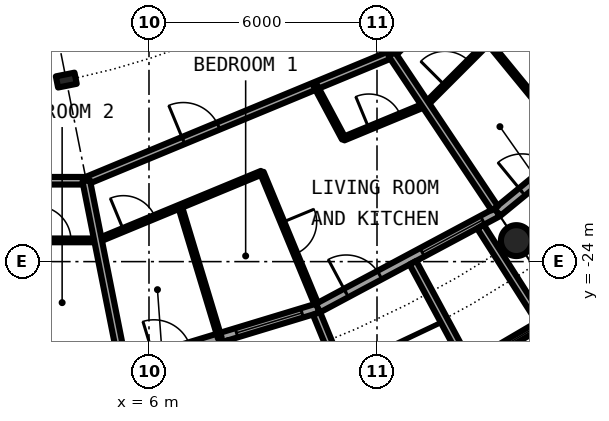
"""IFC4 building model, lengths in metres.
Left out: names, types, materials, properties, quantities, classifications, styles, units other than length and angle.
Written with IfcOpenShell. Run it as: python <this file> out.ifc"""

import sys

from ifc_helpers import new_model, si_unit, direction, frame, frame_2d, origin, origin_2d, place, context, subcontext, project, spatial, rectangle, circle, hollow_circle, i_section, extrude, element, fill, save


model = new_model("IFC4")
c1 = context("Model", 3, precision=1e-05, world=origin(), true_north=direction((0.0, 1.0)))
c2 = subcontext(c1, "Body", "Model", "MODEL_VIEW")
j1 = project(units=[si_unit("LENGTHUNIT", "METRE"), si_unit("PLANEANGLEUNIT", "RADIAN")], contexts=[c1])
p1 = place(None, origin())
s1 = spatial("IfcSite", under=j1, at=p1, CompositionType="ELEMENT")
p2 = place(p1, origin())
s2 = spatial("IfcBuilding", under=s1, at=p2, CompositionType="ELEMENT")
p3 = place(p2, frame((0.0, 0.0, 170.75)))
s3 = spatial("IfcBuildingStorey", under=s2, at=p3, CompositionType="ELEMENT", Elevation=170.75)
p4 = place(p3, frame((15.667, -23.448, 0.0), z_axis=(0.0, 0.0, 1.0), x_axis=(1.0, 0.0, 0.0)))
e1 = element("IfcColumn", 1, at=p4, inside=s3, PredefinedType="COLUMN", context=c2, shape_type="SweptSolid", body=[
    extrude(hollow_circle(Radius=0.406, WallThickness=0.04, at=origin_2d()), origin(), (0.0, 0.0, 1.0), 3.05),
])
p5 = place(p3, frame((3.824, -19.223, 0.0), z_axis=(0.0, 0.0, 1.0), x_axis=(0.195090322016, -0.980785280403, 0.0)))
e2 = element("IfcColumn", 2, at=p5, inside=s3, PredefinedType="COLUMN", context=c2, shape_type="SweptSolid", body=[
    extrude(i_section(OverallWidth=0.3, OverallDepth=0.5, WebThickness=0.014, FlangeThickness=0.028, FilletRadius=0.027, at=origin_2d()), origin(), (0.0, 0.0, 1.0), 3.05),
])
p6 = place(p3, frame((5.326, -26.775, 0.0), z_axis=(0.0, 0.0, 1.0), x_axis=(0.956965678721, 0.290201119486, 0.0)))
e3 = element("IfcWall", 3, at=p6, inside=s3, PredefinedType="SOLIDWALL", context=c2, shape_type="SweptSolid", body=[
    extrude(rectangle(XDim=5.351, YDim=0.25, at=frame_2d((2.676, 0.0))), origin(), (0.0, 0.0, 1.0), 2.7),
])
p7 = place(p6, frame((0.841, 0.0, 0.0)))
e4 = element("IfcOpeningElement", 4, at=p7, cuts=e3, PredefinedType="OPENING", context=c2, shape_type="SweptSolid", body=[
    extrude(rectangle(XDim=1.0, YDim=2.2, at=frame_2d((0.5, 1.1))), frame((0.0, 0.135, 0.0), z_axis=(0.0, -1.0, 0.0), x_axis=(1.0, 0.0, 0.0)), (0.0, 0.0, 1.0), 0.27),
])
p8 = place(p6, frame((3.111, 0.0, 0.3)))
e5 = element("IfcOpeningElement", 5, at=p8, cuts=e3, PredefinedType="OPENING", context=c2, shape_type="SweptSolid", body=[
    extrude(rectangle(XDim=1.8, YDim=2.1, at=frame_2d((0.9, 1.05))), frame((0.0, 0.135, 0.0), z_axis=(0.0, -1.0, 0.0), x_axis=(1.0, 0.0, 0.0)), (0.0, 0.0, 1.0), 0.27),
])
p9 = place(p3, frame((8.009, -26.092, -0.03), z_axis=(0.0, 0.0, 1.0), x_axis=(0.293406695073, -0.955987715029, 0.0)))
e6 = element("IfcWall", 6, at=p9, inside=s3, PredefinedType="SOLIDWALL", context=c2, shape_type="SweptSolid", body=[
    extrude(rectangle(XDim=3.006, YDim=0.2, at=frame_2d((1.503, 0.0))), origin(), (0.0, 0.0, 1.0), 2.73),
])
p10 = place(p3, frame((10.409, -25.364, -0.03), z_axis=(0.0, 0.0, 1.0), x_axis=(0.379509886562, -0.925187681501, 0.0)))
e7 = element("IfcWall", 7, at=p10, inside=s3, PredefinedType="SOLIDWALL", context=c2, shape_type="SweptSolid", body=[
    extrude(rectangle(XDim=2.883, YDim=0.2, at=frame_2d((1.441, 0.0))), origin(), (0.0, 0.0, 1.0), 2.73),
])
p11 = place(p3, frame((10.447, -25.222, 0.0), z_axis=(0.0, 0.0, 1.0), x_axis=(0.881915646801, 0.471407246368, 0.0)))
e8 = element("IfcWall", 8, at=p11, inside=s3, PredefinedType="SOLIDWALL", context=c2, shape_type="SweptSolid", body=[
    extrude(rectangle(XDim=5.352, YDim=0.25, at=frame_2d((2.676, 0.0))), origin(), (0.0, 0.0, 1.0), 2.7),
])
p12 = place(p11, frame((0.841, 0.0, 0.0)))
e9 = element("IfcOpeningElement", 9, at=p12, cuts=e8, PredefinedType="OPENING", context=c2, shape_type="SweptSolid", body=[
    extrude(rectangle(XDim=1.0, YDim=2.2, at=frame_2d((0.5, 1.1))), frame((0.0, 0.135, 0.0), z_axis=(0.0, -1.0, 0.0), x_axis=(1.0, 0.0, 0.0)), (0.0, 0.0, 1.0), 0.27),
])
p13 = place(p11, frame((3.111, 0.0, 0.3)))
e10 = element("IfcOpeningElement", 10, at=p13, cuts=e8, PredefinedType="OPENING", context=c2, shape_type="SweptSolid", body=[
    extrude(rectangle(XDim=1.8, YDim=2.1, at=frame_2d((0.9, 1.05))), frame((0.0, 0.135, 0.0), z_axis=(0.0, -1.0, 0.0), x_axis=(1.0, 0.0, 0.0)), (0.0, 0.0, 1.0), 0.27),
])
p14 = place(p3, frame((14.327, -26.812, -0.03), z_axis=(0.0, 0.0, 1.0), x_axis=(0.862403467503, 0.506221551535, 0.0)))
e11 = element("IfcWall", 11, at=p14, inside=s3, PredefinedType="SOLIDWALL", context=c2, shape_type="SweptSolid", body=[
    extrude(rectangle(XDim=2.446, YDim=0.2, at=frame_2d((1.223, 0.0))), origin(), (0.0, 0.0, 1.0), 2.73),
])
p15 = place(p14, frame((0.183, 0.0, 0.33)))
e12 = element("IfcOpeningElement", 12, at=p15, cuts=e11, PredefinedType="OPENING", context=c2, shape_type="SweptSolid", body=[
    extrude(circle(Radius=1.04, at=frame_2d((1.04, 1.04))), frame((0.0, 0.11, 0.0), z_axis=(0.0, -1.0, 0.0), x_axis=(1.0, 0.0, 0.0)), (0.0, 0.0, 1.0), 0.22),
])
p16 = place(p3, frame((12.945, -24.029, -0.03), z_axis=(0.0, 0.0, 1.0), x_axis=(0.474424310775, -0.88029629861, 0.0)))
e13 = element("IfcWall", 13, at=p16, inside=s3, PredefinedType="SOLIDWALL", context=c2, shape_type="SweptSolid", body=[
    extrude(rectangle(XDim=3.006, YDim=0.2, at=frame_2d((1.503, 0.0))), origin(), (0.0, 0.0, 1.0), 2.73),
])
p17 = place(p3, frame((14.722, -23.079, -0.03), z_axis=(0.0, 0.0, 1.0), x_axis=(0.537572179146, -0.843217737129, 0.0)))
e14 = element("IfcWall", 14, at=p17, inside=s3, PredefinedType="SOLIDWALL", context=c2, shape_type="SweptSolid", body=[
    extrude(rectangle(XDim=2.924, YDim=0.2, at=frame_2d((1.462, 0.0))), origin(), (0.0, 0.0, 1.0), 2.73),
])
p18 = place(p3, frame((15.167, -22.699, 0.0), z_axis=(0.0, 0.0, 1.0), x_axis=(0.773019449054, 0.634382322723, 0.0)))
e15 = element("IfcWall", 15, at=p18, inside=s3, PredefinedType="SOLIDWALL", context=c2, shape_type="SweptSolid", body=[
    extrude(rectangle(XDim=5.352, YDim=0.25, at=frame_2d((2.676, 0.0))), origin(), (0.0, 0.0, 1.0), 2.7),
])
p19 = place(p18, frame((0.841, 0.0, 0.0)))
e16 = element("IfcOpeningElement", 16, at=p19, cuts=e15, PredefinedType="OPENING", context=c2, shape_type="SweptSolid", body=[
    extrude(rectangle(XDim=1.0, YDim=2.2, at=frame_2d((0.5, 1.1))), frame((0.0, 0.135, 0.0), z_axis=(0.0, -1.0, 0.0), x_axis=(1.0, 0.0, 0.0)), (0.0, 0.0, 1.0), 0.27),
])
p20 = place(p18, frame((3.111, 0.0, 0.3)))
e17 = element("IfcOpeningElement", 17, at=p20, cuts=e15, PredefinedType="OPENING", context=c2, shape_type="SweptSolid", body=[
    extrude(rectangle(XDim=1.8, YDim=2.1, at=frame_2d((0.9, 1.05))), frame((0.0, 0.135, 0.0), z_axis=(0.0, -1.0, 0.0), x_axis=(1.0, 0.0, 0.0)), (0.0, 0.0, 1.0), 0.27),
])
p21 = place(p3, frame((0.0, -23.441, 0.0), z_axis=(0.0, 0.0, 1.0), x_axis=(1.0, 0.0, 0.0)))
e18 = element("IfcWall", 18, at=p21, inside=s3, PredefinedType="PARTITIONING", context=c2, shape_type="SweptSolid", body=[
    extrude(rectangle(XDim=4.663, YDim=0.1, at=frame_2d((2.332, 0.0))), origin(), (0.0, 0.0, 1.0), 2.7),
])
p22 = place(p21, frame((3.047, 0.0, 0.0)))
e19 = element("IfcOpeningElement", 19, at=p22, cuts=e18, PredefinedType="OPENING", context=c2, shape_type="SweptSolid", body=[
    extrude(rectangle(XDim=0.9, YDim=2.3, at=frame_2d((0.45, 1.15))), frame((0.0, 0.06, 0.0), z_axis=(0.0, -1.0, 0.0), x_axis=(1.0, 0.0, 0.0)), (0.0, 0.0, 1.0), 0.12),
])
p23 = place(p3, frame((4.656, -23.442, 0.0), z_axis=(0.0, 0.0, 1.0), x_axis=(0.923994503548, 0.382405749712, 0.0)))
e20 = element("IfcWall", 20, at=p23, inside=s3, PredefinedType="PARTITIONING", context=c2, shape_type="SweptSolid", body=[
    extrude(rectangle(XDim=4.663, YDim=0.1, at=frame_2d((2.331, 0.0))), origin(), (0.0, 0.0, 1.0), 2.7),
])
p24 = place(p23, frame((0.726, 0.0, 0.0)))
e21 = element("IfcOpeningElement", 21, at=p24, cuts=e20, PredefinedType="OPENING", context=c2, shape_type="SweptSolid", body=[
    extrude(rectangle(XDim=0.9, YDim=2.3, at=frame_2d((0.45, 1.15))), frame((0.0, 0.06, 0.0), z_axis=(0.0, -1.0, 0.0), x_axis=(1.0, 0.0, 0.0)), (0.0, 0.0, 1.0), 0.12),
])
p25 = place(p3, frame((11.124, -20.764, 0.0), z_axis=(0.0, 0.0, 1.0), x_axis=(0.923938991376, 0.382539854414, 0.0)))
e22 = element("IfcWall", 22, at=p25, inside=s3, PredefinedType="PARTITIONING", context=c2, shape_type="SweptSolid", body=[
    extrude(rectangle(XDim=2.331, YDim=0.1, at=frame_2d((1.166, 0.0))), origin(), (0.0, 0.0, 1.0), 2.7),
])
p26 = place(p25, frame((0.716, 0.0, 0.0)))
e23 = element("IfcOpeningElement", 23, at=p26, cuts=e22, PredefinedType="OPENING", context=c2, shape_type="SweptSolid", body=[
    extrude(rectangle(XDim=0.9, YDim=2.3, at=frame_2d((0.45, 1.15))), frame((0.0, 0.06, 0.0), z_axis=(0.0, -1.0, 0.0), x_axis=(1.0, 0.0, 0.0)), (0.0, 0.0, 1.0), 0.12),
])
p27 = place(p3, frame((13.285, -19.869, 0.0), z_axis=(0.0, 0.0, 1.0), x_axis=(0.706923494552, 0.707290020325, 0.0)))
e24 = element("IfcWall", 24, at=p27, inside=s3, PredefinedType="PARTITIONING", context=c2, shape_type="SweptSolid", body=[
    extrude(rectangle(XDim=4.663, YDim=0.1, at=frame_2d((2.331, 0.0))), origin(), (0.0, 0.0, 1.0), 2.7),
])
p28 = place(p27, frame((0.712, 0.0, 0.0)))
e25 = element("IfcOpeningElement", 25, at=p28, cuts=e24, PredefinedType="OPENING", context=c2, shape_type="SweptSolid", body=[
    extrude(rectangle(XDim=0.9, YDim=2.3, at=frame_2d((0.45, 1.15))), frame((0.0, 0.06, 0.0), z_axis=(0.0, -1.0, 0.0), x_axis=(1.0, 0.0, 0.0)), (0.0, 0.0, 1.0), 0.12),
])
p29 = place(p3, frame((-4.351, -21.872, 0.0), z_axis=(0.0, 0.0, 1.0), x_axis=(1.0, 0.0, 0.0)))
e26 = element("IfcWall", 26, at=p29, inside=s3, PredefinedType="PARTITIONING", context=c2, shape_type="SweptSolid", body=[
    extrude(rectangle(XDim=8.702, YDim=0.2, at=frame_2d((4.351, 0.0))), origin(), (0.0, 0.0, 1.0), 2.7),
])
p30 = place(p29, frame((4.939, 0.0, 0.0)))
e27 = element("IfcOpeningElement", 27, at=p30, cuts=e26, PredefinedType="OPENING", context=c2, shape_type="SweptSolid", body=[
    extrude(rectangle(XDim=1.0, YDim=2.3, at=frame_2d((0.5, 1.15))), frame((0.0, 0.11, 0.0), z_axis=(0.0, -1.0, 0.0), x_axis=(1.0, 0.0, 0.0)), (0.0, 0.0, 1.0), 0.22),
])
p31 = place(p3, frame((4.351, -21.872, 0.0), z_axis=(0.0, 0.0, 1.0), x_axis=(0.923825356298, 0.382814199136, 0.0)))
e28 = element("IfcWall", 28, at=p31, inside=s3, PredefinedType="PARTITIONING", context=c2, shape_type="SweptSolid", body=[
    extrude(rectangle(XDim=8.704, YDim=0.2, at=frame_2d((4.352, 0.0))), origin(), (0.0, 0.0, 1.0), 2.7),
])
p32 = place(p31, frame((2.763, 0.0, 0.0)))
e29 = element("IfcOpeningElement", 29, at=p32, cuts=e28, PredefinedType="OPENING", context=c2, shape_type="SweptSolid", body=[
    extrude(rectangle(XDim=1.0, YDim=2.3, at=frame_2d((0.5, 1.15))), frame((0.0, 0.11, 0.0), z_axis=(0.0, -1.0, 0.0), x_axis=(1.0, 0.0, 0.0)), (0.0, 0.0, 1.0), 0.22),
])
p33 = place(p3, frame((12.389, -18.542, 0.0), z_axis=(0.0, 0.0, 1.0), x_axis=(0.707106781187, 0.707106781187, 0.0)))
e30 = element("IfcWall", 30, at=p33, inside=s3, PredefinedType="PARTITIONING", context=c2, shape_type="SweptSolid", body=[
    extrude(rectangle(XDim=8.702, YDim=0.2, at=frame_2d((4.351, 0.0))), origin(), (0.0, 0.0, 1.0), 2.7),
])
p34 = place(p33, frame((2.763, 0.0, 0.0)))
e31 = element("IfcOpeningElement", 31, at=p34, cuts=e30, PredefinedType="OPENING", context=c2, shape_type="SweptSolid", body=[
    extrude(rectangle(XDim=1.0, YDim=2.3, at=frame_2d((0.5, 1.15))), frame((0.0, 0.11, 0.0), z_axis=(0.0, -1.0, 0.0), x_axis=(1.0, 0.0, 0.0)), (0.0, 0.0, 1.0), 0.22),
])
p35 = place(p3, frame((4.348, -21.873, 0.0), z_axis=(0.0, 0.0, 1.0), x_axis=(0.194931286287, -0.980816901173, 0.0)))
e32 = element("IfcWall", 32, at=p35, inside=s3, PredefinedType="PARTITIONING", context=c2, shape_type="SweptSolid", body=[
    extrude(rectangle(XDim=4.875, YDim=0.2, at=frame_2d((2.437, 0.0))), origin(), (0.0, 0.0, 1.0), 2.7),
])
p36 = place(p3, frame((6.817, -22.549, 0.0), z_axis=(0.0, 0.0, 1.0), x_axis=(0.289439829793, -0.957196210256, 0.0)))
e33 = element("IfcWall", 33, at=p36, inside=s3, PredefinedType="PARTITIONING", context=c2, shape_type="SweptSolid", body=[
    extrude(rectangle(XDim=3.618, YDim=0.1, at=frame_2d((1.809, 0.0))), origin(), (0.0, 0.0, 1.0), 2.7),
])
p37 = place(p3, frame((8.97, -21.656, 0.0), z_axis=(0.0, 0.0, 1.0), x_axis=(0.382669377748, -0.923885353999, 0.0)))
e34 = element("IfcWall", 34, at=p37, inside=s3, PredefinedType="PARTITIONING", context=c2, shape_type="SweptSolid", body=[
    extrude(rectangle(XDim=3.734, YDim=0.1, at=frame_2d((1.867, 0.0))), origin(), (0.0, 0.0, 1.0), 2.7),
])
p38 = place(p37, frame((1.417, 0.0, 0.0)))
e35 = element("IfcOpeningElement", 35, at=p38, cuts=e34, PredefinedType="OPENING", context=c2, shape_type="SweptSolid", body=[
    extrude(rectangle(XDim=0.9, YDim=2.3, at=frame_2d((0.45, 1.15))), frame((0.0, 0.06, 0.0), z_axis=(0.0, -1.0, 0.0), x_axis=(1.0, 0.0, 0.0)), (0.0, 0.0, 1.0), 0.12),
])
p39 = place(p3, frame((10.38, -19.374, 0.0), z_axis=(0.0, 0.0, 1.0), x_axis=(0.472002235476, -0.881597351236, 0.0)))
e36 = element("IfcWall", 36, at=p39, inside=s3, PredefinedType="PARTITIONING", context=c2, shape_type="SweptSolid", body=[
    extrude(rectangle(XDim=1.577, YDim=0.1, at=frame_2d((0.788, 0.0))), origin(), (0.0, 0.0, 1.0), 2.7),
])
p40 = place(p3, frame((12.389, -18.542, 0.0), z_axis=(0.0, 0.0, 1.0), x_axis=(0.55569370664, -0.831387096605, 0.0)))
e37 = element("IfcWall", 37, at=p40, inside=s3, PredefinedType="PARTITIONING", context=c2, shape_type="SweptSolid", body=[
    extrude(rectangle(XDim=4.875, YDim=0.2, at=frame_2d((2.438, 0.0))), origin(), (0.0, 0.0, 1.0), 2.7),
])
p41 = place(p3, frame((14.927, -18.224, 0.0), z_axis=(0.0, 0.0, 1.0), x_axis=(0.633737383709, -0.773548271597, 0.0)))
e38 = element("IfcWall", 38, at=p41, inside=s3, PredefinedType="PARTITIONING", context=c2, shape_type="SweptSolid", body=[
    extrude(rectangle(XDim=3.618, YDim=0.1, at=frame_2d((1.809, 0.0))), origin(), (0.0, 0.0, 1.0), 2.7),
])
p42 = place(p8, origin())
e39 = element("IfcWindow", 39, at=p42, inside=s3, PartitioningType="SINGLE_PANEL", PredefinedType="WINDOW", context=c2, shape_type="SweptSolid", body=[
    extrude(rectangle(XDim=1.8, YDim=2.1, at=frame_2d((0.9, 1.05))), frame((0.0, 0.03, 0.0), z_axis=(0.0, -1.0, 0.0), x_axis=(1.0, 0.0, 0.0)), (0.0, 0.0, 1.0), 0.06),
])
fill(e5, e39)
p43 = place(p12, origin())
e40 = element("IfcDoor", 40, at=p43, inside=s3, OperationType="SINGLE_SWING_LEFT", PredefinedType="DOOR", context=c2, shape_type="SweptSolid", body=[
    extrude(rectangle(XDim=1.0, YDim=2.2, at=frame_2d((0.5, 1.1))), frame((0.0, 0.025, 0.0), z_axis=(0.0, -1.0, 0.0), x_axis=(1.0, 0.0, 0.0)), (0.0, 0.0, 1.0), 0.05),
])
fill(e9, e40)
p44 = place(p13, origin())
e41 = element("IfcWindow", 41, at=p44, inside=s3, PartitioningType="SINGLE_PANEL", PredefinedType="WINDOW", context=c2, shape_type="SweptSolid", body=[
    extrude(rectangle(XDim=1.8, YDim=2.1, at=frame_2d((0.9, 1.05))), frame((0.0, 0.03, 0.0), z_axis=(0.0, -1.0, 0.0), x_axis=(1.0, 0.0, 0.0)), (0.0, 0.0, 1.0), 0.06),
])
fill(e10, e41)
p45 = place(p15, origin())
e42 = element("IfcWindow", 42, at=p45, inside=s3, PartitioningType="SINGLE_PANEL", PredefinedType="WINDOW", context=c2, shape_type="SweptSolid", body=[
    extrude(circle(Radius=1.04, at=frame_2d((1.04, 1.04))), frame((0.0, 0.03, 0.0), z_axis=(0.0, -1.0, 0.0), x_axis=(1.0, 0.0, 0.0)), (0.0, 0.0, 1.0), 0.06),
])
fill(e12, e42)
p46 = place(p19, origin())
e43 = element("IfcDoor", 43, at=p46, inside=s3, OperationType="SINGLE_SWING_LEFT", PredefinedType="DOOR", context=c2, shape_type="SweptSolid", body=[
    extrude(rectangle(XDim=1.0, YDim=2.2, at=frame_2d((0.5, 1.1))), frame((0.0, 0.025, 0.0), z_axis=(0.0, -1.0, 0.0), x_axis=(1.0, 0.0, 0.0)), (0.0, 0.0, 1.0), 0.05),
])
fill(e16, e43)
p47 = place(p22, origin())
e44 = element("IfcDoor", 44, at=p47, inside=s3, OperationType="SINGLE_SWING_RIGHT", PredefinedType="DOOR", context=c2, shape_type="SweptSolid", body=[
    extrude(rectangle(XDim=0.9, YDim=2.3, at=frame_2d((0.45, 1.15))), frame((0.0, 0.025, 0.0), z_axis=(0.0, -1.0, 0.0), x_axis=(1.0, 0.0, 0.0)), (0.0, 0.0, 1.0), 0.05),
])
fill(e19, e44)
p48 = place(p32, origin())
e45 = element("IfcDoor", 45, at=p48, inside=s3, OperationType="SINGLE_SWING_LEFT", PredefinedType="DOOR", context=c2, shape_type="SweptSolid", body=[
    extrude(rectangle(XDim=1.0, YDim=2.3, at=frame_2d((0.5, 1.15))), frame((0.0, 0.025, 0.0), z_axis=(0.0, -1.0, 0.0), x_axis=(1.0, 0.0, 0.0)), (0.0, 0.0, 1.0), 0.05),
])
fill(e29, e45)
p49 = place(p26, origin())
e46 = element("IfcDoor", 46, at=p49, inside=s3, OperationType="SINGLE_SWING_RIGHT", PredefinedType="DOOR", context=c2, shape_type="SweptSolid", body=[
    extrude(rectangle(XDim=0.9, YDim=2.3, at=frame_2d((0.45, 1.15))), frame((0.0, 0.025, 0.0), z_axis=(0.0, -1.0, 0.0), x_axis=(1.0, 0.0, 0.0)), (0.0, 0.0, 1.0), 0.05),
])
fill(e23, e46)
p50 = place(p38, origin())
e47 = element("IfcDoor", 47, at=p50, inside=s3, OperationType="SINGLE_SWING_RIGHT", PredefinedType="DOOR", context=c2, shape_type="SweptSolid", body=[
    extrude(rectangle(XDim=0.9, YDim=2.3, at=frame_2d((0.45, 1.15))), frame((0.0, 0.025, 0.0), z_axis=(0.0, -1.0, 0.0), x_axis=(1.0, 0.0, 0.0)), (0.0, 0.0, 1.0), 0.05),
])
fill(e35, e47)
p51 = place(p24, origin())
e48 = element("IfcDoor", 48, at=p51, inside=s3, OperationType="SINGLE_SWING_LEFT", PredefinedType="DOOR", context=c2, shape_type="SweptSolid", body=[
    extrude(rectangle(XDim=0.9, YDim=2.3, at=frame_2d((0.45, 1.15))), frame((0.0, 0.025, 0.0), z_axis=(0.0, -1.0, 0.0), x_axis=(1.0, 0.0, 0.0)), (0.0, 0.0, 1.0), 0.05),
])
fill(e21, e48)
p52 = place(p28, origin())
e49 = element("IfcDoor", 49, at=p52, inside=s3, OperationType="SINGLE_SWING_LEFT", PredefinedType="DOOR", context=c2, shape_type="SweptSolid", body=[
    extrude(rectangle(XDim=0.9, YDim=2.3, at=frame_2d((0.45, 1.15))), frame((0.0, 0.025, 0.0), z_axis=(0.0, -1.0, 0.0), x_axis=(1.0, 0.0, 0.0)), (0.0, 0.0, 1.0), 0.05),
])
fill(e25, e49)
save(model, sys.argv[1])
